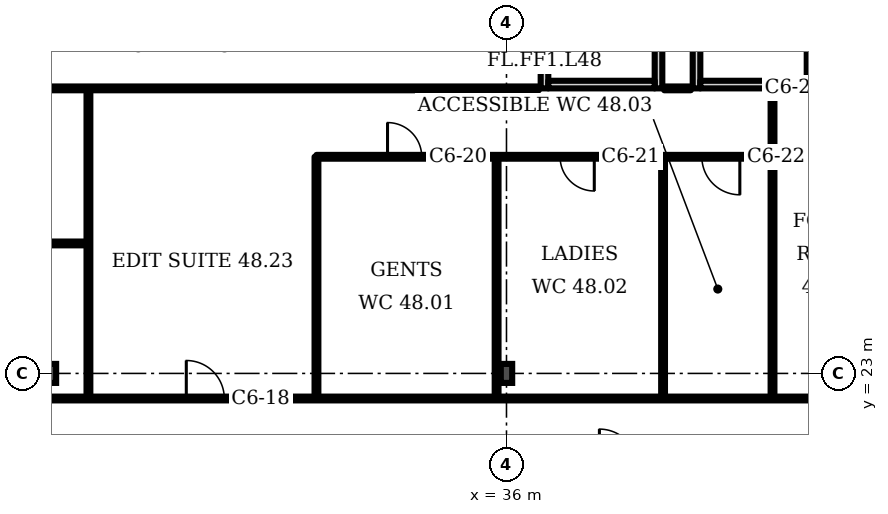
"""IFC4 building model, lengths in metres.
Left out: names, types, materials, properties, quantities, classifications, styles, units other than length and angle.
Written with IfcOpenShell. Run it as: python <this file> out.ifc"""

import sys

from ifc_helpers import new_model, si_unit, direction, frame, frame_2d, origin, origin_2d, place, context, subcontext, project, spatial, rectangle, i_section, extrude, element, fill, save


model = new_model("IFC4")
c1 = context("Model", 3, precision=1e-05, world=origin(), true_north=direction((0.0, 1.0)))
c2 = subcontext(c1, "Body", "Model", "MODEL_VIEW")
j1 = project(units=[si_unit("LENGTHUNIT", "METRE"), si_unit("PLANEANGLEUNIT", "RADIAN")], contexts=[c1])
p1 = place(None, origin())
s1 = spatial("IfcSite", under=j1, at=p1, CompositionType="ELEMENT")
p2 = place(p1, origin())
s2 = spatial("IfcBuilding", under=s1, at=p2, CompositionType="ELEMENT")
p3 = place(p2, frame((0.0, 0.0, 195.1)))
s3 = spatial("IfcBuildingStorey", under=s2, at=p3, CompositionType="ELEMENT", Elevation=195.1)
for number, where, z_axis, x_axis in (
    (1, (24.0, 23.0, 0.0), (0.0, 0.0, 1.0), (1.0, 0.0, 0.0)),
    (2, (36.0, 23.0, 0.0), (0.0, 0.0, 1.0), (1.0, 0.0, 0.0)),
):
    element("IfcColumn", number, at=place(p3, frame(where, z_axis=z_axis, x_axis=x_axis)), inside=s3, PredefinedType="COLUMN", context=c2, shape_type="SweptSolid", body=[
        extrude(i_section(OverallWidth=0.3, OverallDepth=0.5, WebThickness=0.014, FlangeThickness=0.028, FilletRadius=0.027, at=origin_2d()), origin(), (0.0, 0.0, 1.0), 3.6),
    ])
p4 = place(p3, frame((37.0, 30.5, 0.0), z_axis=(0.0, 0.0, 1.0), x_axis=(0.0, 1.0, 0.0)))
e3 = element("IfcWall", 3, at=p4, inside=s3, PredefinedType="PARTITIONING", context=c2, shape_type="SweptSolid", body=[
    extrude(rectangle(XDim=3.5, YDim=0.2, at=frame_2d((1.75, 0.0))), origin(), (0.0, 0.0, 1.0), 3.2),
])
p5 = place(p4, frame((1.2, 0.0, 0.0)))
e4 = element("IfcOpeningElement", 4, at=p5, cuts=e3, PredefinedType="OPENING", context=c2, shape_type="SweptSolid", body=[
    extrude(rectangle(XDim=1.1, YDim=2.1, at=frame_2d((0.55, 1.05))), frame((0.0, 0.11, 0.0), z_axis=(0.0, -1.0, 0.0), x_axis=(1.0, 0.0, 0.0)), (0.0, 0.0, 1.0), 0.22),
])
p6 = place(p3, frame((40.0, 30.5, 0.0), z_axis=(0.0, 0.0, 1.0), x_axis=(0.0, 1.0, 0.0)))
e5 = element("IfcWall", 5, at=p6, inside=s3, PredefinedType="PARTITIONING", context=c2, shape_type="SweptSolid", body=[
    extrude(rectangle(XDim=3.5, YDim=0.2, at=frame_2d((1.75, 0.0))), origin(), (0.0, 0.0, 1.0), 3.2),
])
p7 = place(p3, frame((37.1, 30.6, 0.0), z_axis=(0.0, 0.0, 1.0), x_axis=(1.0, 0.0, 0.0)))
e6 = element("IfcWall", 6, at=p7, inside=s3, PredefinedType="PARTITIONING", context=c2, shape_type="SweptSolid", body=[
    extrude(rectangle(XDim=2.8, YDim=0.2, at=frame_2d((1.4, 0.0))), origin(), (0.0, 0.0, 1.0), 3.2),
])
p8 = place(p3, frame((41.0, 30.5, 0.0), z_axis=(0.0, 0.0, 1.0), x_axis=(0.0, 1.0, 0.0)))
e7 = element("IfcWall", 7, at=p8, inside=s3, PredefinedType="PARTITIONING", context=c2, shape_type="SweptSolid", body=[
    extrude(rectangle(XDim=3.5, YDim=0.2, at=frame_2d((1.75, 0.0))), origin(), (0.0, 0.0, 1.0), 3.2),
])
p9 = place(p3, frame((44.0, 30.5, 0.0), z_axis=(0.0, 0.0, 1.0), x_axis=(0.0, 1.0, 0.0)))
e8 = element("IfcWall", 8, at=p9, inside=s3, PredefinedType="PARTITIONING", context=c2, shape_type="SweptSolid", body=[
    extrude(rectangle(XDim=3.5, YDim=0.2, at=frame_2d((1.75, 0.0))), origin(), (0.0, 0.0, 1.0), 3.2),
])
p10 = place(p9, frame((1.2, 0.0, 0.0)))
e9 = element("IfcOpeningElement", 9, at=p10, cuts=e8, PredefinedType="OPENING", context=c2, shape_type="SweptSolid", body=[
    extrude(rectangle(XDim=1.1, YDim=2.1, at=frame_2d((0.55, 1.05))), frame((0.0, 0.11, 0.0), z_axis=(0.0, -1.0, 0.0), x_axis=(1.0, 0.0, 0.0)), (0.0, 0.0, 1.0), 0.22),
])
p11 = place(p3, frame((41.1, 30.6, 0.0), z_axis=(0.0, 0.0, 1.0), x_axis=(1.0, 0.0, 0.0)))
e10 = element("IfcWall", 10, at=p11, inside=s3, PredefinedType="PARTITIONING", context=c2, shape_type="SweptSolid", body=[
    extrude(rectangle(XDim=2.8, YDim=0.2, at=frame_2d((1.4, 0.0))), origin(), (0.0, 0.0, 1.0), 3.2),
])
p12 = place(p3, frame((18.2, 26.42, 0.0), z_axis=(0.0, 0.0, 1.0), x_axis=(1.0, 0.0, 0.0)))
e11 = element("IfcWall", 11, at=p12, inside=s3, PredefinedType="PARTITIONING", context=c2, shape_type="SweptSolid", body=[
    extrude(rectangle(XDim=6.8, YDim=0.1, at=frame_2d((3.4, 0.0))), origin(), (0.0, 0.0, 1.0), 3.2),
])
p13 = place(p3, frame((18.2, 30.5, 0.0), z_axis=(0.0, 0.0, 1.0), x_axis=(1.0, 0.0, 0.0)))
e12 = element("IfcWall", 12, at=p13, inside=s3, PredefinedType="PARTITIONING", context=c2, shape_type="SweptSolid", body=[
    extrude(rectangle(XDim=18.65, YDim=0.1, at=frame_2d((9.325, 0.0))), origin(), (0.0, 0.0, 1.0), 3.2),
])
p14 = place(p13, frame((0.74, 0.0, 0.0)))
e13 = element("IfcOpeningElement", 13, at=p14, cuts=e12, PredefinedType="OPENING", context=c2, shape_type="SweptSolid", body=[
    extrude(rectangle(XDim=1.0, YDim=2.1, at=frame_2d((0.5, 1.05))), frame((0.0, 0.06, 0.0), z_axis=(0.0, -1.0, 0.0), x_axis=(1.0, 0.0, 0.0)), (0.0, 0.0, 1.0), 0.12),
])
p15 = place(p3, frame((18.955, 22.34, 0.0), z_axis=(0.0, 0.0, 1.0), x_axis=(1.0, 0.0, 0.0)))
e14 = element("IfcWall", 14, at=p15, inside=s3, PredefinedType="PARTITIONING", context=c2, shape_type="SweptSolid", body=[
    extrude(rectangle(XDim=42.555, YDim=0.1, at=frame_2d((21.277, 0.0))), origin(), (0.0, 0.0, 1.0), 3.2),
])
p16 = place(p15, frame((0.62, 0.0, 0.0)))
e15 = element("IfcOpeningElement", 15, at=p16, cuts=e14, PredefinedType="OPENING", context=c2, shape_type="SweptSolid", body=[
    extrude(rectangle(XDim=1.0, YDim=2.1, at=frame_2d((0.5, 1.05))), frame((0.0, 0.06, 0.0), z_axis=(0.0, -1.0, 0.0), x_axis=(1.0, 0.0, 0.0)), (0.0, 0.0, 1.0), 0.12),
])
p17 = place(p15, frame((8.62, 0.0, 0.0)))
e16 = element("IfcOpeningElement", 16, at=p17, cuts=e14, PredefinedType="OPENING", context=c2, shape_type="SweptSolid", body=[
    extrude(rectangle(XDim=1.0, YDim=2.1, at=frame_2d((0.5, 1.05))), frame((0.0, 0.06, 0.0), z_axis=(0.0, -1.0, 0.0), x_axis=(1.0, 0.0, 0.0)), (0.0, 0.0, 1.0), 0.12),
])
p18 = place(p3, frame((25.0, 22.34, 0.0), z_axis=(0.0, 0.0, 1.0), x_axis=(0.0, 1.0, 0.0)))
e17 = element("IfcWall", 17, at=p18, inside=s3, PredefinedType="PARTITIONING", context=c2, shape_type="SweptSolid", body=[
    extrude(rectangle(XDim=8.16, YDim=0.1, at=frame_2d((4.08, 0.0))), origin(), (0.0, 0.0, 1.0), 3.2),
])
p19 = place(p3, frame((31.0, 22.34, 0.0), z_axis=(0.0, 0.0, 1.0), x_axis=(0.0, 1.0, 0.0)))
e18 = element("IfcWall", 18, at=p19, inside=s3, PredefinedType="PARTITIONING", context=c2, shape_type="SweptSolid", body=[
    extrude(rectangle(XDim=6.36, YDim=0.1, at=frame_2d((3.18, 0.0))), origin(), (0.0, 0.0, 1.0), 3.2),
])
p20 = place(p3, frame((31.0, 28.7, 0.0), z_axis=(0.0, 0.0, 1.0), x_axis=(1.0, 0.0, 0.0)))
e19 = element("IfcWall", 19, at=p20, inside=s3, PredefinedType="PARTITIONING", context=c2, shape_type="SweptSolid", body=[
    extrude(rectangle(XDim=12.0, YDim=0.1, at=frame_2d((6.0, 0.0))), origin(), (0.0, 0.0, 1.0), 3.2),
])
p21 = place(p20, frame((1.87, 0.0, 0.0)))
e20 = element("IfcOpeningElement", 20, at=p21, cuts=e19, PredefinedType="OPENING", context=c2, shape_type="SweptSolid", body=[
    extrude(rectangle(XDim=0.9, YDim=2.1, at=frame_2d((0.45, 1.05))), frame((0.0, 0.06, 0.0), z_axis=(0.0, -1.0, 0.0), x_axis=(1.0, 0.0, 0.0)), (0.0, 0.0, 1.0), 0.12),
])
p22 = place(p20, frame((6.41, 0.0, 0.0)))
e21 = element("IfcOpeningElement", 21, at=p22, cuts=e19, PredefinedType="OPENING", context=c2, shape_type="SweptSolid", body=[
    extrude(rectangle(XDim=0.9, YDim=2.1, at=frame_2d((0.45, 1.05))), frame((0.0, 0.06, 0.0), z_axis=(0.0, -1.0, 0.0), x_axis=(1.0, 0.0, 0.0)), (0.0, 0.0, 1.0), 0.12),
])
p23 = place(p20, frame((10.14, 0.0, 0.0)))
e22 = element("IfcOpeningElement", 22, at=p23, cuts=e19, PredefinedType="OPENING", context=c2, shape_type="SweptSolid", body=[
    extrude(rectangle(XDim=1.0, YDim=2.1, at=frame_2d((0.5, 1.05))), frame((0.0, 0.06, 0.0), z_axis=(0.0, -1.0, 0.0), x_axis=(1.0, 0.0, 0.0)), (0.0, 0.0, 1.0), 0.12),
])
for number, where, z_axis, x_axis in (
    (23, (35.74, 22.34, 0.0), (0.0, 0.0, 1.0), (0.0, 1.0, 0.0)),
    (24, (40.12, 22.34, 0.0), (0.0, 0.0, 1.0), (0.0, 1.0, 0.0)),
):
    element("IfcWall", number, at=place(p3, frame(where, z_axis=z_axis, x_axis=x_axis)), inside=s3, PredefinedType="PARTITIONING", context=c2, shape_type="SweptSolid", body=[
        extrude(rectangle(XDim=6.36, YDim=0.1, at=frame_2d((3.18, 0.0))), origin(), (0.0, 0.0, 1.0), 3.2),
    ])
p24 = place(p3, frame((43.0, 22.34, 0.0), z_axis=(0.0, 0.0, 1.0), x_axis=(0.0, 1.0, 0.0)))
e25 = element("IfcWall", 25, at=p24, inside=s3, PredefinedType="PARTITIONING", context=c2, shape_type="SweptSolid", body=[
    extrude(rectangle(XDim=8.15, YDim=0.1, at=frame_2d((4.075, 0.0))), origin(), (0.0, 0.0, 1.0), 3.2),
])
p25 = place(p3, frame((40.15, 30.5, 0.0), z_axis=(0.0, 0.0, 1.0), x_axis=(1.0, 0.0, 0.0)))
e26 = element("IfcWall", 26, at=p25, inside=s3, PredefinedType="PARTITIONING", context=c2, shape_type="SweptSolid", body=[
    extrude(rectangle(XDim=0.7, YDim=0.1, at=frame_2d((0.35, 0.0))), origin(), (0.0, 0.0, 1.0), 3.2),
])
p26 = place(p17, origin())
e27 = element("IfcDoor", 27, at=p26, inside=s3, OperationType="SINGLE_SWING_LEFT", PredefinedType="DOOR", context=c2, shape_type="SweptSolid", body=[
    extrude(rectangle(XDim=1.0, YDim=2.1, at=frame_2d((0.5, 1.05))), frame((0.0, 0.025, 0.0), z_axis=(0.0, -1.0, 0.0), x_axis=(1.0, 0.0, 0.0)), (0.0, 0.0, 1.0), 0.05),
])
fill(e16, e27)
p27 = place(p21, origin())
e28 = element("IfcDoor", 28, at=p27, inside=s3, OperationType="SINGLE_SWING_LEFT", PredefinedType="DOOR", context=c2, shape_type="SweptSolid", body=[
    extrude(rectangle(XDim=0.9, YDim=2.1, at=frame_2d((0.45, 1.05))), frame((0.0, 0.025, 0.0), z_axis=(0.0, -1.0, 0.0), x_axis=(1.0, 0.0, 0.0)), (0.0, 0.0, 1.0), 0.05),
])
fill(e20, e28)
p28 = place(p22, origin())
e29 = element("IfcDoor", 29, at=p28, inside=s3, OperationType="SINGLE_SWING_RIGHT", PredefinedType="DOOR", context=c2, shape_type="SweptSolid", body=[
    extrude(rectangle(XDim=0.9, YDim=2.1, at=frame_2d((0.45, 1.05))), frame((0.0, 0.025, 0.0), z_axis=(0.0, -1.0, 0.0), x_axis=(1.0, 0.0, 0.0)), (0.0, 0.0, 1.0), 0.05),
])
fill(e21, e29)
p29 = place(p23, origin())
e30 = element("IfcDoor", 30, at=p29, inside=s3, OperationType="SINGLE_SWING_RIGHT", PredefinedType="DOOR", context=c2, shape_type="SweptSolid", body=[
    extrude(rectangle(XDim=1.0, YDim=2.1, at=frame_2d((0.5, 1.05))), frame((0.0, 0.025, 0.0), z_axis=(0.0, -1.0, 0.0), x_axis=(1.0, 0.0, 0.0)), (0.0, 0.0, 1.0), 0.05),
])
fill(e22, e30)
save(model, sys.argv[1])
